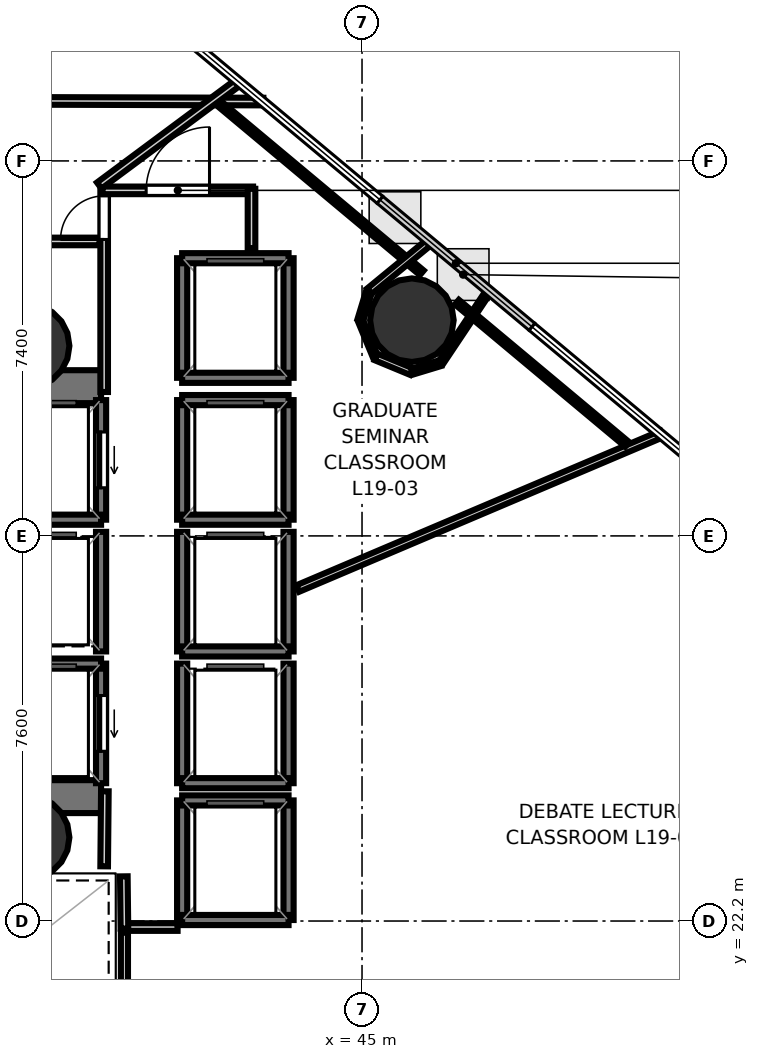
"""IFC4 building model, lengths in metres.
Left out: names, types, materials, properties, quantities, classifications, styles, units other than length and angle.
Written with IfcOpenShell. Run it as: python <this file> out.ifc"""

import sys

from ifc_helpers import new_model, si_unit, direction, frame, frame_2d, origin, origin_2d, place, context, subcontext, project, spatial, rectangle, hollow_circle, extrude, element, fill, save


model = new_model("IFC4")
c1 = context("Model", 3, precision=1e-05, world=origin(), true_north=direction((0.0, 1.0)))
c2 = subcontext(c1, "Body", "Model", "MODEL_VIEW")
j1 = project(units=[si_unit("LENGTHUNIT", "METRE"), si_unit("PLANEANGLEUNIT", "RADIAN")], contexts=[c1])
p1 = place(None, origin())
s1 = spatial("IfcSite", under=j1, at=p1, CompositionType="ELEMENT")
p2 = place(p1, origin())
s2 = spatial("IfcBuilding", under=s1, at=p2, CompositionType="ELEMENT")
p3 = place(p2, frame((0.0, 0.0, 78.4)))
s3 = spatial("IfcBuildingStorey", under=s2, at=p3, CompositionType="ELEMENT", Elevation=78.4)
p4 = place(p3, frame((29.13, 32.745, 0.0), z_axis=(0.0, 0.0, 1.0), x_axis=(1.0, 0.0, 0.0)))
e1 = element("IfcWall", 1, at=p4, inside=s3, PredefinedType="SHEAR", context=c2, shape_type="SweptSolid", body=[
    extrude(rectangle(XDim=10.72, YDim=0.65, at=frame_2d((5.36, 0.0))), origin(), (0.0, 0.0, 1.0), 3.52),
])
p5 = place(p4, frame((1.095, 0.0, 0.0)))
e2 = element("IfcOpeningElement", 2, at=p5, cuts=e1, PredefinedType="OPENING", context=c2, shape_type="SweptSolid", body=[
    extrude(rectangle(XDim=1.25, YDim=2.15, at=frame_2d((0.625, 1.075))), frame((0.0, 0.335, 0.0), z_axis=(0.0, -1.0, 0.0), x_axis=(1.0, 0.0, 0.0)), (0.0, 0.0, 1.0), 0.67),
])
p6 = place(p3, frame((29.13, 24.655, 0.0), z_axis=(0.0, 0.0, 1.0), x_axis=(1.0, 0.0, 0.0)))
e3 = element("IfcWall", 3, at=p6, inside=s3, PredefinedType="SHEAR", context=c2, shape_type="SweptSolid", body=[
    extrude(rectangle(XDim=10.72, YDim=0.65, at=frame_2d((5.36, 0.0))), origin(), (0.0, 0.0, 1.0), 3.52),
])
p7 = place(p6, frame((0.895, 0.0, 0.0)))
e4 = element("IfcOpeningElement", 4, at=p7, cuts=e3, PredefinedType="OPENING", context=c2, shape_type="SweptSolid", body=[
    extrude(rectangle(XDim=1.25, YDim=2.15, at=frame_2d((0.625, 1.075))), frame((0.0, 0.335, 0.0), z_axis=(0.0, -1.0, 0.0), x_axis=(1.0, 0.0, 0.0)), (0.0, 0.0, 1.0), 0.67),
])
for number, where, z_axis, x_axis in (
    (5, (38.4, 33.55, 0.0), (0.0, 0.0, 1.0), (1.0, 0.0, 0.0)),
    (6, (38.4, 23.85, 0.0), (0.0, 0.0, 1.0), (1.0, 0.0, 0.0)),
    (7, (45.984, 34.057, 0.0), (0.0, 0.0, 1.0), (1.0, 0.0, 0.0)),
):
    element("IfcColumn", number, at=place(p3, frame(where, z_axis=z_axis, x_axis=x_axis)), inside=s3, PredefinedType="COLUMN", context=c2, shape_type="SweptSolid", body=[
        extrude(hollow_circle(Radius=0.825, WallThickness=0.04, at=origin_2d()), origin(), (0.0, 0.0, 1.0), 3.7),
    ])
p8 = place(p3, frame((39.85, 30.12, 0.0), z_axis=(0.0, 0.0, 1.0), x_axis=(0.0, 1.0, 0.0)))
e8 = element("IfcWall", 8, at=p8, inside=s3, PredefinedType="SOLIDWALL", context=c2, shape_type="SweptSolid", body=[
    extrude(rectangle(XDim=2.36, YDim=0.2, at=frame_2d((1.18, 0.0))), origin(), (0.0, 0.0, 1.0), 3.52),
])
p9 = place(p8, frame((0.63, 0.0, 0.0)))
e9 = element("IfcOpeningElement", 9, at=p9, cuts=e8, PredefinedType="OPENING", context=c2, shape_type="SweptSolid", body=[
    extrude(rectangle(XDim=1.1, YDim=2.15, at=frame_2d((0.55, 1.075))), frame((0.0, 0.11, 0.0), z_axis=(0.0, -1.0, 0.0), x_axis=(1.0, 0.0, 0.0)), (0.0, 0.0, 1.0), 0.22),
])
p10 = place(p3, frame((37.75, 30.12, 0.0), z_axis=(0.0, 0.0, 1.0), x_axis=(1.0, 0.0, 0.0)))
e10 = element("IfcWall", 10, at=p10, inside=s3, PredefinedType="SOLIDWALL", context=c2, shape_type="SweptSolid", body=[
    extrude(rectangle(XDim=2.1, YDim=0.2, at=frame_2d((1.05, 0.0))), origin(), (0.0, 0.0, 1.0), 3.52),
])
p11 = place(p3, frame((39.85, 24.92, 0.0), z_axis=(0.0, 0.0, 1.0), x_axis=(0.0, 1.0, 0.0)))
e11 = element("IfcWall", 11, at=p11, inside=s3, PredefinedType="SOLIDWALL", context=c2, shape_type="SweptSolid", body=[
    extrude(rectangle(XDim=2.36, YDim=0.2, at=frame_2d((1.18, 0.0))), origin(), (0.0, 0.0, 1.0), 3.52),
])
p12 = place(p11, frame((0.63, 0.0, 0.0)))
e12 = element("IfcOpeningElement", 12, at=p12, cuts=e11, PredefinedType="OPENING", context=c2, shape_type="SweptSolid", body=[
    extrude(rectangle(XDim=1.1, YDim=2.15, at=frame_2d((0.55, 1.075))), frame((0.0, 0.11, 0.0), z_axis=(0.0, -1.0, 0.0), x_axis=(1.0, 0.0, 0.0)), (0.0, 0.0, 1.0), 0.22),
])
p13 = place(p3, frame((37.75, 27.28, 0.0), z_axis=(0.0, 0.0, 1.0), x_axis=(1.0, 0.0, 0.0)))
e13 = element("IfcWall", 13, at=p13, inside=s3, PredefinedType="SOLIDWALL", context=c2, shape_type="SweptSolid", body=[
    extrude(rectangle(XDim=2.1, YDim=0.2, at=frame_2d((1.05, 0.0))), origin(), (0.0, 0.0, 1.0), 3.52),
])
for number, where, z_axis, x_axis in (
    (14, (43.55, 30.12, 0.0), (0.0, 0.0, 1.0), (0.0, 1.0, 0.0)),
    (15, (41.45, 30.12, 0.0), (0.0, 0.0, 1.0), (0.0, 1.0, 0.0)),
):
    element("IfcWall", number, at=place(p3, frame(where, z_axis=z_axis, x_axis=x_axis)), inside=s3, PredefinedType="SOLIDWALL", context=c2, shape_type="SweptSolid", body=[
        extrude(rectangle(XDim=2.36, YDim=0.2, at=frame_2d((1.18, 0.0))), origin(), (0.0, 0.0, 1.0), 3.52),
    ])
for number, where, z_axis, x_axis in (
    (16, (41.45, 32.48, 0.0), (0.0, 0.0, 1.0), (1.0, 0.0, 0.0)),
    (17, (41.45, 30.12, 0.0), (0.0, 0.0, 1.0), (1.0, 0.0, 0.0)),
):
    element("IfcWall", number, at=place(p3, frame(where, z_axis=z_axis, x_axis=x_axis)), inside=s3, PredefinedType="SOLIDWALL", context=c2, shape_type="SweptSolid", body=[
        extrude(rectangle(XDim=2.1, YDim=0.2, at=frame_2d((1.05, 0.0))), origin(), (0.0, 0.0, 1.0), 3.52),
    ])
for number, where, z_axis, x_axis in (
    (18, (43.55, 27.52, 0.0), (0.0, 0.0, 1.0), (0.0, 1.0, 0.0)),
    (19, (41.45, 27.52, 0.0), (0.0, 0.0, 1.0), (0.0, 1.0, 0.0)),
):
    element("IfcWall", number, at=place(p3, frame(where, z_axis=z_axis, x_axis=x_axis)), inside=s3, PredefinedType="SOLIDWALL", context=c2, shape_type="SweptSolid", body=[
        extrude(rectangle(XDim=2.36, YDim=0.2, at=frame_2d((1.18, 0.0))), origin(), (0.0, 0.0, 1.0), 3.52),
    ])
p14 = place(p3, frame((41.45, 27.52, 0.0), z_axis=(0.0, 0.0, 1.0), x_axis=(1.0, 0.0, 0.0)))
e20 = element("IfcWall", 20, at=p14, inside=s3, PredefinedType="SOLIDWALL", context=c2, shape_type="SweptSolid", body=[
    extrude(rectangle(XDim=2.1, YDim=0.2, at=frame_2d((1.05, 0.0))), origin(), (0.0, 0.0, 1.0), 3.52),
])
for number, where, z_axis, x_axis in (
    (21, (43.55, 24.92, 0.0), (0.0, 0.0, 1.0), (0.0, 1.0, 0.0)),
    (22, (41.45, 24.92, 0.0), (0.0, 0.0, 1.0), (0.0, 1.0, 0.0)),
):
    element("IfcWall", number, at=place(p3, frame(where, z_axis=z_axis, x_axis=x_axis)), inside=s3, PredefinedType="SOLIDWALL", context=c2, shape_type="SweptSolid", body=[
        extrude(rectangle(XDim=2.36, YDim=0.2, at=frame_2d((1.18, 0.0))), origin(), (0.0, 0.0, 1.0), 3.52),
    ])
p15 = place(p3, frame((41.45, 24.92, 0.0), z_axis=(0.0, 0.0, 1.0), x_axis=(1.0, 0.0, 0.0)))
e23 = element("IfcWall", 23, at=p15, inside=s3, PredefinedType="SOLIDWALL", context=c2, shape_type="SweptSolid", body=[
    extrude(rectangle(XDim=2.1, YDim=0.2, at=frame_2d((1.05, 0.0))), origin(), (0.0, 0.0, 1.0), 3.52),
])
p16 = place(p3, frame((39.85, 27.52, 0.0), z_axis=(0.0, 0.0, 1.0), x_axis=(0.0, 1.0, 0.0)))
e24 = element("IfcWall", 24, at=p16, inside=s3, PredefinedType="SOLIDWALL", context=c2, shape_type="SweptSolid", body=[
    extrude(rectangle(XDim=2.36, YDim=0.2, at=frame_2d((1.18, 0.0))), origin(), (0.0, 0.0, 1.0), 3.52),
])
for number, where, z_axis, x_axis in (
    (25, (43.55, 22.22, 0.0), (0.0, 0.0, 1.0), (0.0, 1.0, 0.0)),
    (26, (41.45, 22.22, 0.0), (0.0, 0.0, 1.0), (0.0, 1.0, 0.0)),
):
    element("IfcWall", number, at=place(p3, frame(where, z_axis=z_axis, x_axis=x_axis)), inside=s3, PredefinedType="SOLIDWALL", context=c2, shape_type="SweptSolid", body=[
        extrude(rectangle(XDim=2.36, YDim=0.2, at=frame_2d((1.18, 0.0))), origin(), (0.0, 0.0, 1.0), 3.52),
    ])
for number, where, z_axis, x_axis in (
    (27, (41.45, 24.58, 0.0), (0.0, 0.0, 1.0), (1.0, 0.0, 0.0)),
    (28, (41.45, 22.22, 0.0), (0.0, 0.0, 1.0), (1.0, 0.0, 0.0)),
):
    element("IfcWall", number, at=place(p3, frame(where, z_axis=z_axis, x_axis=x_axis)), inside=s3, PredefinedType="SOLIDWALL", context=c2, shape_type="SweptSolid", body=[
        extrude(rectangle(XDim=2.1, YDim=0.2, at=frame_2d((1.05, 0.0))), origin(), (0.0, 0.0, 1.0), 3.52),
    ])
for number, where, z_axis, x_axis in (
    (29, (43.55, 32.92, 0.0), (0.0, 0.0, 1.0), (0.0, 1.0, 0.0)),
    (30, (41.45, 32.92, 0.0), (0.0, 0.0, 1.0), (0.0, 1.0, 0.0)),
):
    element("IfcWall", number, at=place(p3, frame(where, z_axis=z_axis, x_axis=x_axis)), inside=s3, PredefinedType="SOLIDWALL", context=c2, shape_type="SweptSolid", body=[
        extrude(rectangle(XDim=2.36, YDim=0.2, at=frame_2d((1.18, 0.0))), origin(), (0.0, 0.0, 1.0), 3.52),
    ])
for number, where, z_axis, x_axis in (
    (31, (41.45, 35.28, 0.0), (0.0, 0.0, 1.0), (1.0, 0.0, 0.0)),
    (32, (41.45, 32.92, 0.0), (0.0, 0.0, 1.0), (1.0, 0.0, 0.0)),
):
    element("IfcWall", number, at=place(p3, frame(where, z_axis=z_axis, x_axis=x_axis)), inside=s3, PredefinedType="SOLIDWALL", context=c2, shape_type="SweptSolid", body=[
        extrude(rectangle(XDim=2.1, YDim=0.2, at=frame_2d((1.05, 0.0))), origin(), (0.0, 0.0, 1.0), 3.52),
    ])
p17 = place(p3, frame((39.911, 32.64, 0.0), z_axis=(0.0, 0.0, 1.0), x_axis=(0.0, 1.0, 0.0)))
e33 = element("IfcWall", 33, at=p17, inside=s3, PredefinedType="PARTITIONING", context=c2, shape_type="SweptSolid", body=[
    extrude(rectangle(XDim=4.01, YDim=0.15, at=frame_2d((2.005, 0.0))), origin(), (0.0, 0.0, 1.0), 2.84),
])
p18 = place(p17, frame((3.01, 0.0, 0.0)))
e34 = element("IfcOpeningElement", 34, at=p18, cuts=e33, PredefinedType="OPENING", context=c2, shape_type="SweptSolid", body=[
    extrude(rectangle(XDim=0.86, YDim=2.05, at=frame_2d((0.43, 1.025))), frame((0.0, 0.085, 0.0), z_axis=(0.0, -1.0, 0.0), x_axis=(1.0, 0.0, 0.0)), (0.0, 0.0, 1.0), 0.17),
])
p19 = place(p3, frame((39.88, 36.619, 0.0), z_axis=(0.0, 0.0, 1.0), x_axis=(1.0, 0.0, 0.0)))
e35 = element("IfcWall", 35, at=p19, inside=s3, PredefinedType="PARTITIONING", context=c2, shape_type="SweptSolid", body=[
    extrude(rectangle(XDim=2.97, YDim=0.15, at=frame_2d((1.485, 0.0))), origin(), (0.0, 0.0, 1.0), 2.798),
])
p20 = place(p19, frame((0.86, 0.0, 0.0)))
e36 = element("IfcOpeningElement", 36, at=p20, cuts=e35, PredefinedType="OPENING", context=c2, shape_type="SweptSolid", body=[
    extrude(rectangle(XDim=1.25, YDim=2.2, at=frame_2d((0.625, 1.1))), frame((0.0, 0.085, 0.0), z_axis=(0.0, -1.0, 0.0), x_axis=(1.0, 0.0, 0.0)), (0.0, 0.0, 1.0), 0.17),
])
p21 = place(p3, frame((42.819, 36.65, 0.0), z_axis=(0.0, 0.0, 1.0), x_axis=(0.0, -1.0, 0.0)))
e37 = element("IfcWall", 37, at=p21, inside=s3, PredefinedType="PARTITIONING", context=c2, shape_type="SweptSolid", body=[
    extrude(rectangle(XDim=1.17, YDim=0.15, at=frame_2d((0.585, 0.0))), origin(), (0.0, 0.0, 1.0), 2.798),
])
p22 = place(p3, frame((41.36, 22.081, 0.0), z_axis=(0.0, 0.0, 1.0), x_axis=(-1.0, 0.0, 0.0)))
e38 = element("IfcWall", 38, at=p22, inside=s3, PredefinedType="PARTITIONING", context=c2, shape_type="SweptSolid", body=[
    extrude(rectangle(XDim=1.08, YDim=0.15, at=frame_2d((0.54, 0.0))), origin(), (0.0, 0.0, 1.0), 2.84),
])
p23 = place(p3, frame((40.311, 22.05, 0.0), z_axis=(0.0, 0.0, 1.0), x_axis=(-0.011836292006, 0.999929948642, 0.0)))
e39 = element("IfcWall", 39, at=p23, inside=s3, PredefinedType="PARTITIONING", context=c2, shape_type="SweptSolid", body=[
    extrude(rectangle(XDim=1.031, YDim=0.15, at=frame_2d((0.516, 0.0))), origin(), (0.0, 0.0, 1.0), 2.84),
])
p24 = place(p3, frame((39.911, 23.28, 0.0), z_axis=(0.0, 0.0, 1.0), x_axis=(0.009397771291, 0.999955839972, 0.0)))
e40 = element("IfcWall", 40, at=p24, inside=s3, PredefinedType="PARTITIONING", context=c2, shape_type="SweptSolid", body=[
    extrude(rectangle(XDim=1.481, YDim=0.15, at=frame_2d((0.74, 0.0))), origin(), (0.0, 0.0, 1.0), 2.84),
])
p25 = place(p3, frame((26.42, 38.419, 0.0), z_axis=(0.0, 0.0, 1.0), x_axis=(0.999995903761, -0.002862247552, 0.0)))
e41 = element("IfcWall", 41, at=p25, inside=s3, PredefinedType="PARTITIONING", context=c2, shape_type="SweptSolid", body=[
    extrude(rectangle(XDim=16.633, YDim=0.15, at=frame_2d((8.316, 0.0))), origin(), (0.0, 0.0, 1.0), 2.798),
])
p26 = place(p25, frame((7.528, 0.0, 0.0)))
e42 = element("IfcOpeningElement", 42, at=p26, cuts=e41, PredefinedType="OPENING", context=c2, shape_type="SweptSolid", body=[
    extrude(rectangle(XDim=1.25, YDim=2.2, at=frame_2d((0.625, 1.1))), frame((0.0, 0.085, 0.0), z_axis=(0.0, -1.0, 0.0), x_axis=(1.0, 0.0, 0.0)), (0.0, 0.0, 1.0), 0.17),
])
p27 = place(p3, frame((42.584, 38.771, 0.0), z_axis=(0.0, 0.0, 1.0), x_axis=(-0.802818352311, -0.596223693921, 0.0)))
e43 = element("IfcWall", 43, at=p27, inside=s3, PredefinedType="PARTITIONING", context=c2, shape_type="SweptSolid", body=[
    extrude(rectangle(XDim=3.451, YDim=0.15, at=frame_2d((1.725, 0.0))), origin(), (0.0, 0.0, 1.0), 2.798),
])
p28 = place(p3, frame((39.818, 35.611, 0.0), z_axis=(0.0, 0.0, 1.0), x_axis=(-1.0, 0.0, 0.0)))
e44 = element("IfcWall", 44, at=p28, inside=s3, PredefinedType="PARTITIONING", context=c2, shape_type="SweptSolid", body=[
    extrude(rectangle(XDim=2.968, YDim=0.15, at=frame_2d((1.484, 0.0))), origin(), (0.0, 0.0, 1.0), 2.84),
])
p29 = place(p3, frame((40.311, 18.0, 0.0), z_axis=(0.0, 0.0, 1.0), x_axis=(0.0, 1.0, 0.0)))
e45 = element("IfcWall", 45, at=p29, inside=s3, PredefinedType="PARTITIONING", context=c2, shape_type="SweptSolid", body=[
    extrude(rectangle(XDim=3.97, YDim=0.14, at=frame_2d((1.985, 0.0))), origin(), (0.0, 0.0, 1.0), 2.84),
])
p30 = place(p3, frame((43.732, 28.762, 0.0), z_axis=(0.0, 0.0, 1.0), x_axis=(0.920505405919, 0.390729826958, 0.0)))
e46 = element("IfcWall", 46, at=p30, inside=s3, PredefinedType="PARTITIONING", context=c2, shape_type="SweptSolid", body=[
    extrude(rectangle(XDim=7.803, YDim=0.14, at=frame_2d((3.901, 0.0))), origin(), (0.0, 0.0, 1.0), 2.798),
])
p31 = place(p3, frame((42.184, 38.33, 0.0), z_axis=(0.0, 0.0, 1.0), x_axis=(0.767463569337, -0.641092559417, 0.0)))
e47 = element("IfcWall", 47, at=p31, inside=s3, PredefinedType="PARTITIONING", context=c2, shape_type="SweptSolid", body=[
    extrude(rectangle(XDim=5.207, YDim=0.12, at=frame_2d((2.603, 0.0))), origin(), (0.0, 0.0, 1.0), 2.798),
])
p32 = place(p3, frame((46.356, 35.621, 0.0), z_axis=(0.0, 0.0, 1.0), x_axis=(-0.773081212675, -0.634307053885, 0.0)))
e48 = element("IfcWall", 48, at=p32, inside=s3, PredefinedType="PARTITIONING", context=c2, shape_type="SweptSolid", body=[
    extrude(rectangle(XDim=1.566, YDim=0.14, at=frame_2d((0.783, 0.0))), origin(), (0.0, 0.0, 1.0), 2.798),
])
p33 = place(p3, frame((45.135, 34.613, 0.0), z_axis=(0.0, 0.0, 1.0), x_axis=(-0.290244314669, -0.956952578659, 0.0)))
e49 = element("IfcWall", 49, at=p33, inside=s3, PredefinedType="PARTITIONING", context=c2, shape_type="SweptSolid", body=[
    extrude(rectangle(XDim=0.572, YDim=0.12, at=frame_2d((0.286, 0.0))), origin(), (0.0, 0.0, 1.0), 2.798),
])
p34 = place(p3, frame((44.97, 34.045, 0.0), z_axis=(0.0, 0.0, 1.0), x_axis=(0.382475742879, -0.923965532966, 0.0)))
e50 = element("IfcWall", 50, at=p34, inside=s3, PredefinedType="PARTITIONING", context=c2, shape_type="SweptSolid", body=[
    extrude(rectangle(XDim=0.754, YDim=0.105, at=frame_2d((0.377, 0.0))), origin(), (0.0, 0.0, 1.0), 2.84),
])
p35 = place(p3, frame((45.276, 33.332, 0.0), z_axis=(0.0, 0.0, 1.0), x_axis=(0.923965532966, -0.382475742879, 0.0)))
e51 = element("IfcWall", 51, at=p35, inside=s3, PredefinedType="PARTITIONING", context=c2, shape_type="SweptSolid", body=[
    extrude(rectangle(XDim=0.754, YDim=0.14, at=frame_2d((0.377, 0.0))), origin(), (0.0, 0.0, 1.0), 2.84),
])
p36 = place(p3, frame((45.993, 33.042, 0.0), z_axis=(0.0, 0.0, 1.0), x_axis=(0.956952578659, 0.290244314669, 0.0)))
e52 = element("IfcWall", 52, at=p36, inside=s3, PredefinedType="PARTITIONING", context=c2, shape_type="SweptSolid", body=[
    extrude(rectangle(XDim=0.572, YDim=0.12, at=frame_2d((0.286, 0.0))), origin(), (0.0, 0.0, 1.0), 2.798),
])
p37 = place(p3, frame((46.557, 33.221, 0.0), z_axis=(0.0, 0.0, 1.0), x_axis=(0.555549804561, 0.831483261799, 0.0)))
e53 = element("IfcWall", 53, at=p37, inside=s3, PredefinedType="PARTITIONING", context=c2, shape_type="SweptSolid", body=[
    extrude(rectangle(XDim=1.724, YDim=0.105, at=frame_2d((0.862, 0.0))), origin(), (0.0, 0.0, 1.0), 2.798),
])
p38 = place(p3, frame((46.872, 34.414, 0.0), z_axis=(0.0, 0.0, 1.0), x_axis=(0.767480346399, -0.641072474757, 0.0)))
e54 = element("IfcWall", 54, at=p38, inside=s3, PredefinedType="PARTITIONING", context=c2, shape_type="SweptSolid", body=[
    extrude(rectangle(XDim=4.378, YDim=0.12, at=frame_2d((2.189, 0.0))), origin(), (0.0, 0.0, 1.0), 2.84),
])
p39 = place(p9, origin())
e55 = element("IfcDoor", 55, at=p39, inside=s3, OperationType="SLIDING_TO_LEFT", PredefinedType="DOOR", context=c2, shape_type="SweptSolid", body=[
    extrude(rectangle(XDim=1.1, YDim=2.15, at=frame_2d((0.55, 1.075))), frame((0.0, 0.025, 0.0), z_axis=(0.0, -1.0, 0.0), x_axis=(1.0, 0.0, 0.0)), (0.0, 0.0, 1.0), 0.05),
])
fill(e9, e55)
p40 = place(p12, origin())
e56 = element("IfcDoor", 56, at=p40, inside=s3, OperationType="SLIDING_TO_LEFT", PredefinedType="DOOR", context=c2, shape_type="SweptSolid", body=[
    extrude(rectangle(XDim=1.1, YDim=2.15, at=frame_2d((0.55, 1.075))), frame((0.0, 0.025, 0.0), z_axis=(0.0, -1.0, 0.0), x_axis=(1.0, 0.0, 0.0)), (0.0, 0.0, 1.0), 0.05),
])
fill(e12, e56)
p41 = place(p18, origin())
e57 = element("IfcDoor", 57, at=p41, inside=s3, OperationType="SINGLE_SWING_LEFT", PredefinedType="DOOR", context=c2, shape_type="SweptSolid", body=[
    extrude(rectangle(XDim=0.86, YDim=2.05, at=frame_2d((0.43, 1.025))), frame((0.0, 0.025, 0.0), z_axis=(0.0, -1.0, 0.0), x_axis=(1.0, 0.0, 0.0)), (0.0, 0.0, 1.0), 0.05),
])
fill(e34, e57)
p42 = place(p20, origin())
e58 = element("IfcDoor", 58, at=p42, inside=s3, OperationType="SINGLE_SWING_RIGHT", PredefinedType="DOOR", context=c2, shape_type="SweptSolid", body=[
    extrude(rectangle(XDim=1.25, YDim=2.2, at=frame_2d((0.625, 1.1))), frame((0.0, 0.025, 0.0), z_axis=(0.0, -1.0, 0.0), x_axis=(1.0, 0.0, 0.0)), (0.0, 0.0, 1.0), 0.05),
])
fill(e36, e58)
save(model, sys.argv[1])
